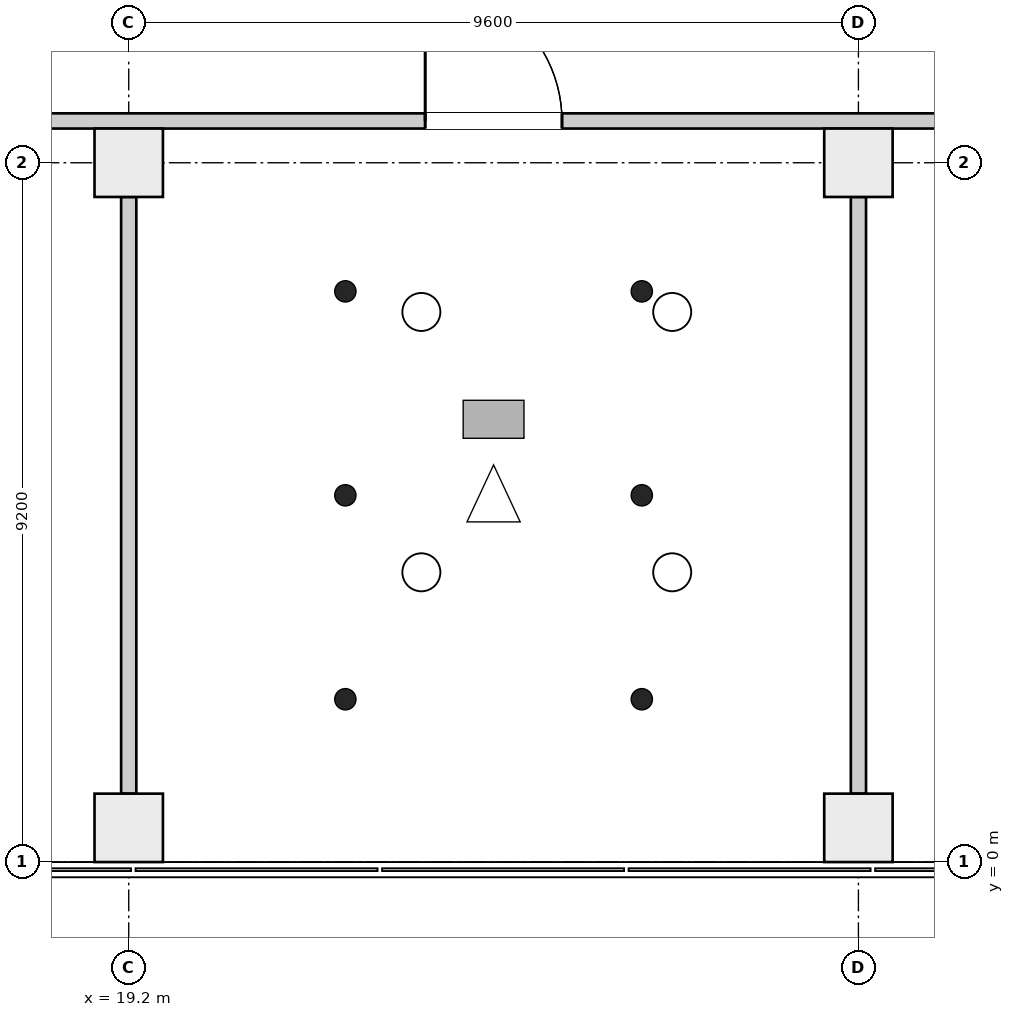
"""IFC4 building model, lengths in metres.
Left out: names, types, materials, properties, quantities, classifications, styles, units other than length and angle.
Written with IfcOpenShell. Run it as: python <this file> out.ifc"""

import sys

from ifc_helpers import new_model, si_unit, direction, frame, frame_2d, origin, origin_2d, place, context, subcontext, project, spatial, rectangle, extrude, element, fill, save


model = new_model("IFC4")
c1 = context("Model", 3, precision=1e-05, world=origin(), true_north=direction((0.0, 1.0)))
c2 = subcontext(c1, "Body", "Model", "MODEL_VIEW")
j1 = project(units=[si_unit("LENGTHUNIT", "METRE"), si_unit("PLANEANGLEUNIT", "RADIAN")], contexts=[c1])
p1 = place(None, origin())
s1 = spatial("IfcSite", under=j1, at=p1, CompositionType="ELEMENT")
p2 = place(p1, origin())
s2 = spatial("IfcBuilding", under=s1, at=p2, CompositionType="ELEMENT")
p3 = place(p2, frame((0.0, 0.0, 61.3)))
s3 = spatial("IfcBuildingStorey", under=s2, at=p3, CompositionType="ELEMENT", Elevation=61.3)
for number, where, z_axis, x_axis in (
    (1, (19.2, 0.45, 0.0), (0.0, 0.0, 1.0), (1.0, 0.0, 0.0)),
    (2, (28.8, 0.45, 0.0), (0.0, 0.0, 1.0), (1.0, 0.0, 0.0)),
    (3, (19.2, 9.2, 0.0), (0.0, 0.0, 1.0), (1.0, 0.0, 0.0)),
    (4, (28.8, 9.2, 0.0), (0.0, 0.0, 1.0), (1.0, 0.0, 0.0)),
):
    element("IfcColumn", number, at=place(p3, frame(where, z_axis=z_axis, x_axis=x_axis)), inside=s3, PredefinedType="COLUMN", context=c2, shape_type="SweptSolid", body=[
        extrude(rectangle(XDim=0.9, YDim=0.9, at=origin_2d()), origin(), (0.0, 0.0, 1.0), 4.2),
    ])
p4 = place(p3, frame((4.3, 9.75, 0.0), z_axis=(0.0, 0.0, 1.0), x_axis=(1.0, 0.0, 0.0)))
e5 = element("IfcWall", 5, at=p4, inside=s3, PredefinedType="PARTITIONING", context=c2, shape_type="SweptSolid", body=[
    extrude(rectangle(XDim=43.894, YDim=0.2, at=frame_2d((21.947, 0.0))), origin(), (0.0, 0.0, 1.0), 3.9),
])
p5 = place(p4, frame((18.8, 0.0, 0.0)))
e6 = element("IfcOpeningElement", 6, at=p5, cuts=e5, PredefinedType="OPENING", context=c2, shape_type="SweptSolid", body=[
    extrude(rectangle(XDim=1.8, YDim=2.1, at=frame_2d((0.9, 1.05))), frame((0.0, 0.11, 0.0), z_axis=(0.0, -1.0, 0.0), x_axis=(1.0, 0.0, 0.0)), (0.0, 0.0, 1.0), 0.22),
])
p6 = place(p4, frame((28.7, 0.0, 0.0)))
e7 = element("IfcOpeningElement", 7, at=p6, cuts=e5, PredefinedType="OPENING", context=c2, shape_type="SweptSolid", body=[
    extrude(rectangle(XDim=1.2, YDim=2.1, at=frame_2d((0.6, 1.05))), frame((0.0, 0.11, 0.0), z_axis=(0.0, -1.0, 0.0), x_axis=(1.0, 0.0, 0.0)), (0.0, 0.0, 1.0), 0.22),
])
p7 = place(p4, frame((36.05, 0.0, 0.0)))
e8 = element("IfcOpeningElement", 8, at=p7, cuts=e5, PredefinedType="OPENING", context=c2, shape_type="SweptSolid", body=[
    extrude(rectangle(XDim=0.9, YDim=2.1, at=frame_2d((0.45, 1.05))), frame((0.0, 0.11, 0.0), z_axis=(0.0, -1.0, 0.0), x_axis=(1.0, 0.0, 0.0)), (0.0, 0.0, 1.0), 0.22),
])
p8 = place(p4, frame((40.8, 0.0, 0.0)))
e9 = element("IfcOpeningElement", 9, at=p8, cuts=e5, PredefinedType="OPENING", context=c2, shape_type="SweptSolid", body=[
    extrude(rectangle(XDim=1.2, YDim=2.1, at=frame_2d((0.6, 1.05))), frame((0.0, 0.11, 0.0), z_axis=(0.0, -1.0, 0.0), x_axis=(1.0, 0.0, 0.0)), (0.0, 0.0, 1.0), 0.22),
])
for number, where, z_axis, x_axis in (
    (10, (19.2, 0.9, 0.0), (0.0, 0.0, 1.0), (0.0, 1.0, 0.0)),
    (11, (28.8, 0.9, 0.0), (0.0, 0.0, 1.0), (0.0, 1.0, 0.0)),
):
    element("IfcWall", number, at=place(p3, frame(where, z_axis=z_axis, x_axis=x_axis)), inside=s3, PredefinedType="PARTITIONING", context=c2, shape_type="SweptSolid", body=[
        extrude(rectangle(XDim=7.85, YDim=0.2, at=frame_2d((3.925, 0.0))), origin(), (0.0, 0.0, 1.0), 3.9),
    ])
p9 = place(p5, origin())
e12 = element("IfcDoor", 12, at=p9, inside=s3, OperationType="DOUBLE_DOOR_SINGLE_SWING", PredefinedType="DOOR", context=c2, shape_type="SweptSolid", body=[
    extrude(rectangle(XDim=1.8, YDim=2.1, at=frame_2d((0.9, 1.05))), frame((0.0, 0.025, 0.0), z_axis=(0.0, -1.0, 0.0), x_axis=(1.0, 0.0, 0.0)), (0.0, 0.0, 1.0), 0.05),
])
fill(e6, e12)
save(model, sys.argv[1])
